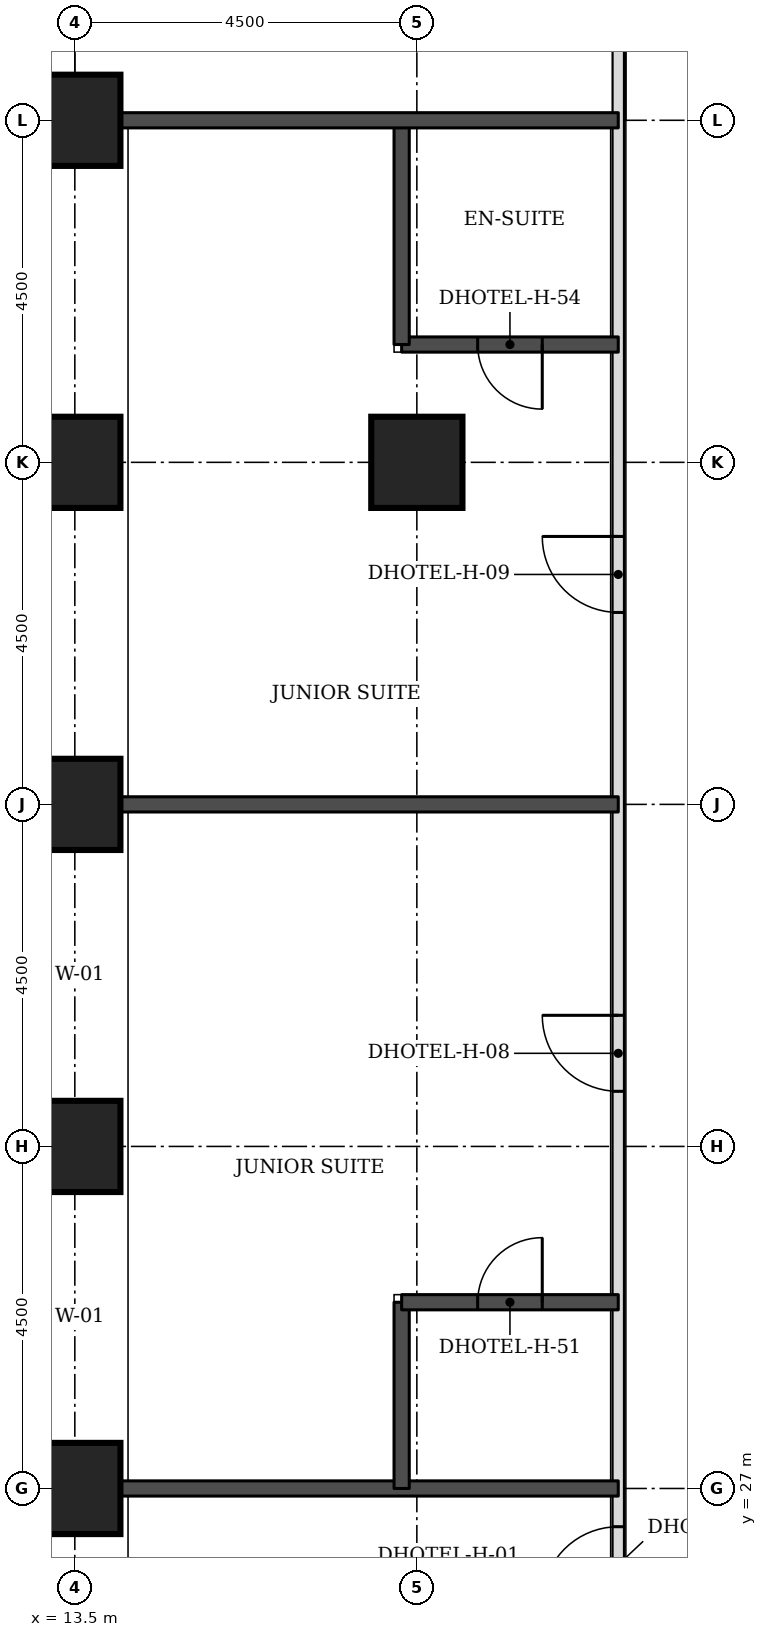
"""IFC4 building model, lengths in metres.
Left out: names, types, materials, properties, quantities, classifications, styles, units other than length and angle.
Written with IfcOpenShell. Run it as: python <this file> out.ifc"""

import sys

from ifc_helpers import new_model, si_unit, direction, frame, frame_2d, origin, origin_2d, place, context, subcontext, project, spatial, rectangle, extrude, element, fill, save


model = new_model("IFC4")
c1 = context("Model", 3, precision=1e-05, world=origin(), true_north=direction((0.0, 1.0)))
c2 = subcontext(c1, "Body", "Model", "MODEL_VIEW")
j1 = project(units=[si_unit("LENGTHUNIT", "METRE"), si_unit("PLANEANGLEUNIT", "RADIAN")], contexts=[c1])
p1 = place(None, origin())
s1 = spatial("IfcSite", under=j1, at=p1, CompositionType="ELEMENT")
p2 = place(p1, origin())
s2 = spatial("IfcBuilding", under=s1, at=p2, CompositionType="ELEMENT")
p3 = place(p2, frame((0.0, 0.0, 46.2)))
s3 = spatial("IfcBuildingStorey", under=s2, at=p3, CompositionType="ELEMENT", Elevation=46.2)
for number, where, z_axis, x_axis in (
    (1, (13.5, 27.0, 0.0), (0.0, 0.0, 1.0), (1.0, 0.0, 0.0)),
    (2, (13.5, 31.5, 0.0), (0.0, 0.0, 1.0), (1.0, 0.0, 0.0)),
    (3, (13.5, 36.0, 0.0), (0.0, 0.0, 1.0), (1.0, 0.0, 0.0)),
    (4, (13.5, 40.5, 0.0), (0.0, 0.0, 1.0), (1.0, 0.0, 0.0)),
    (5, (18.0, 40.5, 0.0), (0.0, 0.0, 1.0), (1.0, 0.0, 0.0)),
    (6, (13.5, 45.0, 0.0), (0.0, 0.0, 1.0), (1.0, 0.0, 0.0)),
):
    element("IfcColumn", number, at=place(p3, frame(where, z_axis=z_axis, x_axis=x_axis)), inside=s3, PredefinedType="COLUMN", context=c2, shape_type="SweptSolid", body=[
        extrude(rectangle(XDim=1.2, YDim=1.2, at=origin_2d()), origin(), (0.0, 0.0, 1.0), 3.3),
    ])
p4 = place(p3, frame((20.65, 25.15, 0.0), z_axis=(0.0, 0.0, 1.0), x_axis=(0.0, 1.0, 0.0)))
e7 = element("IfcWall", 7, at=p4, inside=s3, PredefinedType="PARTITIONING", context=c2, shape_type="SweptSolid", body=[
    extrude(rectangle(XDim=24.35, YDim=0.15, at=frame_2d((12.175, 0.0))), origin(), (0.0, 0.0, 1.0), 3.08),
])
p5 = place(p4, frame((0.347, 0.0, 0.0)))
e8 = element("IfcOpeningElement", 8, at=p5, cuts=e7, PredefinedType="OPENING", context=c2, shape_type="SweptSolid", body=[
    extrude(rectangle(XDim=1.0, YDim=2.1, at=frame_2d((0.5, 1.05))), frame((0.0, 0.085, 0.0), z_axis=(0.0, -1.0, 0.0), x_axis=(1.0, 0.0, 0.0)), (0.0, 0.0, 1.0), 0.17),
])
p6 = place(p4, frame((7.075, 0.0, 0.0)))
e9 = element("IfcOpeningElement", 9, at=p6, cuts=e7, PredefinedType="OPENING", context=c2, shape_type="SweptSolid", body=[
    extrude(rectangle(XDim=1.0, YDim=2.1, at=frame_2d((0.5, 1.05))), frame((0.0, 0.085, 0.0), z_axis=(0.0, -1.0, 0.0), x_axis=(1.0, 0.0, 0.0)), (0.0, 0.0, 1.0), 0.17),
])
p7 = place(p4, frame((13.375, 0.0, 0.0)))
e10 = element("IfcOpeningElement", 10, at=p7, cuts=e7, PredefinedType="OPENING", context=c2, shape_type="SweptSolid", body=[
    extrude(rectangle(XDim=1.0, YDim=2.1, at=frame_2d((0.5, 1.05))), frame((0.0, 0.085, 0.0), z_axis=(0.0, -1.0, 0.0), x_axis=(1.0, 0.0, 0.0)), (0.0, 0.0, 1.0), 0.17),
])
p8 = place(p4, frame((21.54, 0.0, 0.0)))
e11 = element("IfcOpeningElement", 11, at=p8, cuts=e7, PredefinedType="OPENING", context=c2, shape_type="SweptSolid", body=[
    extrude(rectangle(XDim=0.9, YDim=2.1, at=frame_2d((0.45, 1.05))), frame((0.0, 0.085, 0.0), z_axis=(0.0, -1.0, 0.0), x_axis=(1.0, 0.0, 0.0)), (0.0, 0.0, 1.0), 0.17),
])
p9 = place(p3, frame((14.1, 27.0, 0.0), z_axis=(0.0, 0.0, 1.0), x_axis=(1.0, 0.0, 0.0)))
e12 = element("IfcWall", 12, at=p9, inside=s3, PredefinedType="SOLIDWALL", context=c2, shape_type="SweptSolid", body=[
    extrude(rectangle(XDim=6.55, YDim=0.2, at=frame_2d((3.275, 0.0))), origin(), (0.0, 0.0, 1.0), 3.08),
])
p10 = place(p3, frame((17.8, 27.0, 0.0), z_axis=(0.0, 0.0, 1.0), x_axis=(0.0, 1.0, 0.0)))
e13 = element("IfcWall", 13, at=p10, inside=s3, PredefinedType="SOLIDWALL", context=c2, shape_type="SweptSolid", body=[
    extrude(rectangle(XDim=2.45, YDim=0.2, at=frame_2d((1.225, 0.0))), origin(), (0.0, 0.0, 1.0), 3.08),
])
p11 = place(p3, frame((17.8, 29.45, 0.0), z_axis=(0.0, 0.0, 1.0), x_axis=(1.0, 0.0, 0.0)))
e14 = element("IfcWall", 14, at=p11, inside=s3, PredefinedType="SOLIDWALL", context=c2, shape_type="SweptSolid", body=[
    extrude(rectangle(XDim=2.85, YDim=0.2, at=frame_2d((1.425, 0.0))), origin(), (0.0, 0.0, 1.0), 3.08),
])
p12 = place(p11, frame((1.0, 0.0, 0.0)))
e15 = element("IfcOpeningElement", 15, at=p12, cuts=e14, PredefinedType="OPENING", context=c2, shape_type="SweptSolid", body=[
    extrude(rectangle(XDim=0.85, YDim=2.1, at=frame_2d((0.425, 1.05))), frame((0.0, 0.11, 0.0), z_axis=(0.0, -1.0, 0.0), x_axis=(1.0, 0.0, 0.0)), (0.0, 0.0, 1.0), 0.22),
])
p13 = place(p3, frame((14.1, 36.0, 0.0), z_axis=(0.0, 0.0, 1.0), x_axis=(1.0, 0.0, 0.0)))
e16 = element("IfcWall", 16, at=p13, inside=s3, PredefinedType="SOLIDWALL", context=c2, shape_type="SweptSolid", body=[
    extrude(rectangle(XDim=6.55, YDim=0.2, at=frame_2d((3.275, 0.0))), origin(), (0.0, 0.0, 1.0), 3.08),
])
p14 = place(p3, frame((17.8, 42.05, 0.0), z_axis=(0.0, 0.0, 1.0), x_axis=(1.0, 0.0, 0.0)))
e17 = element("IfcWall", 17, at=p14, inside=s3, PredefinedType="SOLIDWALL", context=c2, shape_type="SweptSolid", body=[
    extrude(rectangle(XDim=2.85, YDim=0.2, at=frame_2d((1.425, 0.0))), origin(), (0.0, 0.0, 1.0), 3.08),
])
p15 = place(p14, frame((1.0, 0.0, 0.0)))
e18 = element("IfcOpeningElement", 18, at=p15, cuts=e17, PredefinedType="OPENING", context=c2, shape_type="SweptSolid", body=[
    extrude(rectangle(XDim=0.85, YDim=2.1, at=frame_2d((0.425, 1.05))), frame((0.0, 0.11, 0.0), z_axis=(0.0, -1.0, 0.0), x_axis=(1.0, 0.0, 0.0)), (0.0, 0.0, 1.0), 0.22),
])
p16 = place(p3, frame((17.8, 42.05, 0.0), z_axis=(0.0, 0.0, 1.0), x_axis=(0.0, 1.0, 0.0)))
e19 = element("IfcWall", 19, at=p16, inside=s3, PredefinedType="SOLIDWALL", context=c2, shape_type="SweptSolid", body=[
    extrude(rectangle(XDim=2.95, YDim=0.2, at=frame_2d((1.475, 0.0))), origin(), (0.0, 0.0, 1.0), 3.08),
])
p17 = place(p3, frame((14.1, 45.0, 0.0), z_axis=(0.0, 0.0, 1.0), x_axis=(1.0, 0.0, 0.0)))
e20 = element("IfcWall", 20, at=p17, inside=s3, PredefinedType="SOLIDWALL", context=c2, shape_type="SweptSolid", body=[
    extrude(rectangle(XDim=6.55, YDim=0.2, at=frame_2d((3.275, 0.0))), origin(), (0.0, 0.0, 1.0), 3.08),
])
p18 = place(p5, origin())
e21 = element("IfcDoor", 21, at=p18, inside=s3, OperationType="SINGLE_SWING_LEFT", PredefinedType="DOOR", context=c2, shape_type="SweptSolid", body=[
    extrude(rectangle(XDim=1.0, YDim=2.1, at=frame_2d((0.5, 1.05))), frame((0.0, 0.025, 0.0), z_axis=(0.0, -1.0, 0.0), x_axis=(1.0, 0.0, 0.0)), (0.0, 0.0, 1.0), 0.05),
])
fill(e8, e21)
p19 = place(p6, origin())
e22 = element("IfcDoor", 22, at=p19, inside=s3, OperationType="SINGLE_SWING_RIGHT", PredefinedType="DOOR", context=c2, shape_type="SweptSolid", body=[
    extrude(rectangle(XDim=1.0, YDim=2.1, at=frame_2d((0.5, 1.05))), frame((0.0, 0.025, 0.0), z_axis=(0.0, -1.0, 0.0), x_axis=(1.0, 0.0, 0.0)), (0.0, 0.0, 1.0), 0.05),
])
fill(e9, e22)
p20 = place(p12, origin())
e23 = element("IfcDoor", 23, at=p20, inside=s3, OperationType="SINGLE_SWING_RIGHT", PredefinedType="DOOR", context=c2, shape_type="SweptSolid", body=[
    extrude(rectangle(XDim=0.85, YDim=2.1, at=frame_2d((0.425, 1.05))), frame((0.0, 0.025, 0.0), z_axis=(0.0, -1.0, 0.0), x_axis=(1.0, 0.0, 0.0)), (0.0, 0.0, 1.0), 0.05),
])
fill(e15, e23)
p21 = place(p7, origin())
e24 = element("IfcDoor", 24, at=p21, inside=s3, OperationType="SINGLE_SWING_RIGHT", PredefinedType="DOOR", context=c2, shape_type="SweptSolid", body=[
    extrude(rectangle(XDim=1.0, YDim=2.1, at=frame_2d((0.5, 1.05))), frame((0.0, 0.025, 0.0), z_axis=(0.0, -1.0, 0.0), x_axis=(1.0, 0.0, 0.0)), (0.0, 0.0, 1.0), 0.05),
])
fill(e10, e24)
p22 = place(p15, frame((0.85, 0.0, 0.0), z_axis=(0.0, 0.0, 1.0), x_axis=(-1.0, 0.0, 0.0)))
e25 = element("IfcDoor", 25, at=p22, inside=s3, OperationType="SINGLE_SWING_LEFT", PredefinedType="DOOR", context=c2, shape_type="SweptSolid", body=[
    extrude(rectangle(XDim=0.85, YDim=2.1, at=frame_2d((0.425, 1.05))), frame((0.0, 0.025, 0.0), z_axis=(0.0, -1.0, 0.0), x_axis=(1.0, 0.0, 0.0)), (0.0, 0.0, 1.0), 0.05),
])
fill(e18, e25)
save(model, sys.argv[1])
